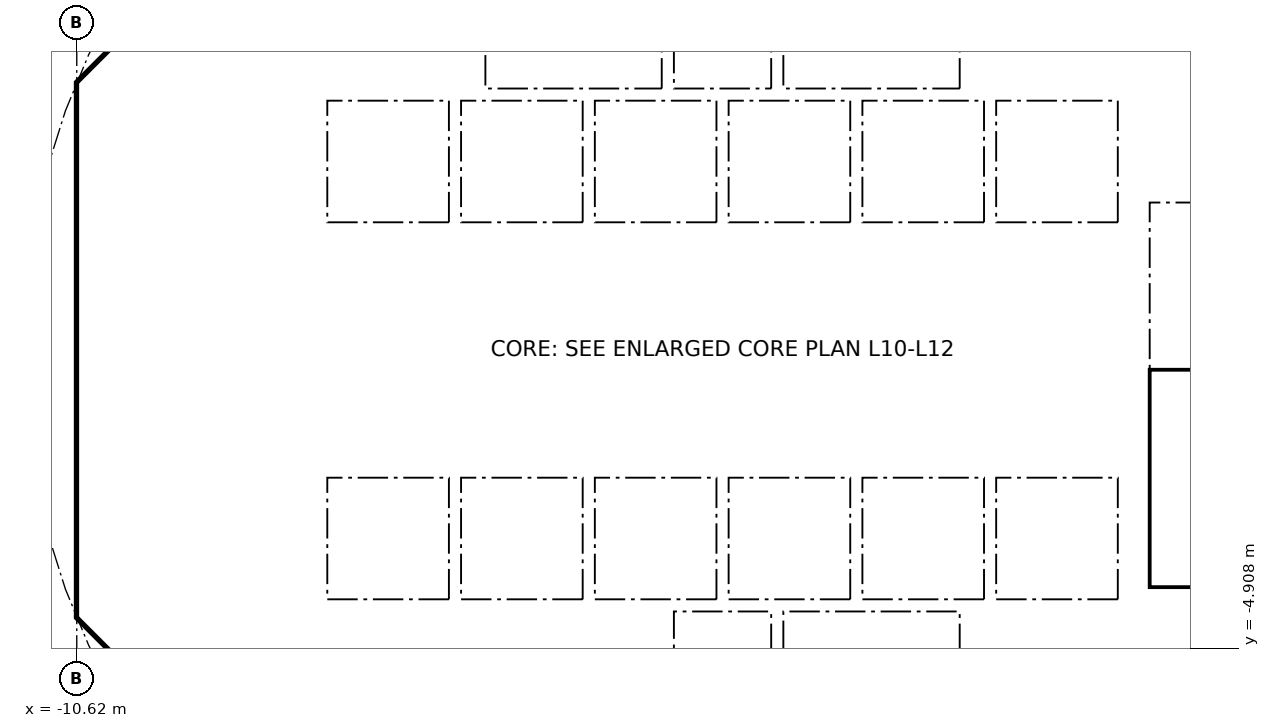
"""IFC4 building model, lengths in metres.
Left out: names, types, materials, properties, quantities, classifications, styles, units other than length and angle.
Written with IfcOpenShell. Run it as: python <this file> out.ifc"""

import sys

from ifc_helpers import new_model, si_unit, direction, frame, frame_2d, origin, place, context, subcontext, project, spatial, polyline, rectangle, outline, extrude, element, fill, save


model = new_model("IFC4")
c1 = context("Model", 3, precision=1e-05, world=origin(), true_north=direction((0.0, 1.0)))
c2 = subcontext(c1, "Body", "Model", "MODEL_VIEW")
j1 = project(units=[si_unit("LENGTHUNIT", "METRE"), si_unit("PLANEANGLEUNIT", "RADIAN")], contexts=[c1])
p1 = place(None, origin())
s1 = spatial("IfcSite", under=j1, at=p1, CompositionType="ELEMENT")
p2 = place(p1, origin())
s2 = spatial("IfcBuilding", under=s1, at=p2, CompositionType="ELEMENT")
p3 = place(p2, frame((0.0, 0.0, 49.2)))
s3 = spatial("IfcBuildingStorey", under=s2, at=p3, CompositionType="ELEMENT", Elevation=49.2)
p4 = place(p3, frame((9.988, 4.613, 0.0), z_axis=(0.0, 0.0, 1.0), x_axis=(-0.707106781187, 0.707106781187, 0.0)))
e1 = element("IfcWall", 1, at=p4, inside=s3, PredefinedType="SHEAR", context=c2, shape_type="SweptSolid", body=[
    extrude(rectangle(XDim=7.602, YDim=0.6, at=frame_2d((3.801, 0.0))), origin(), (0.0, 0.0, 1.0), 3.44),
])
p5 = place(p4, frame((3.201, 0.0, 0.0)))
e2 = element("IfcOpeningElement", 2, at=p5, cuts=e1, PredefinedType="OPENING", context=c2, shape_type="SweptSolid", body=[
    extrude(rectangle(XDim=1.2, YDim=2.1, at=frame_2d((0.6, 1.05))), frame((0.0, 0.31, 0.0), z_axis=(0.0, -1.0, 0.0), x_axis=(1.0, 0.0, 0.0)), (0.0, 0.0, 1.0), 0.62),
])
p6 = place(p3, frame((-4.613, 9.988, 0.0), z_axis=(0.0, 0.0, 1.0), x_axis=(-0.707106781187, -0.707106781187, 0.0)))
e3 = element("IfcWall", 3, at=p6, inside=s3, PredefinedType="SHEAR", context=c2, shape_type="SweptSolid", body=[
    extrude(rectangle(XDim=7.602, YDim=0.6, at=frame_2d((3.801, 0.0))), origin(), (0.0, 0.0, 1.0), 3.44),
])
p7 = place(p6, frame((0.351, 0.0, 0.0)))
e4 = element("IfcOpeningElement", 4, at=p7, cuts=e3, PredefinedType="OPENING", context=c2, shape_type="SweptSolid", body=[
    extrude(rectangle(XDim=1.1, YDim=2.1, at=frame_2d((0.55, 1.05))), frame((0.0, 0.31, 0.0), z_axis=(0.0, -1.0, 0.0), x_axis=(1.0, 0.0, 0.0)), (0.0, 0.0, 1.0), 0.62),
])
p8 = place(p3, frame((-10.325, 3.801, 0.0), z_axis=(0.0, 0.0, 1.0), x_axis=(0.0, -1.0, 0.0)))
e5 = element("IfcWall", 5, at=p8, inside=s3, PredefinedType="SHEAR", context=c2, shape_type="SweptSolid", body=[
    extrude(rectangle(XDim=7.602, YDim=0.6, at=frame_2d((3.801, 0.0))), origin(), (0.0, 0.0, 1.0), 3.44),
])
p9 = place(p8, frame((0.651, 0.0, 0.0)))
e6 = element("IfcOpeningElement", 6, at=p9, cuts=e5, PredefinedType="OPENING", context=c2, shape_type="SweptSolid", body=[
    extrude(rectangle(XDim=1.5, YDim=2.1, at=frame_2d((0.75, 1.05))), frame((0.0, 0.31, 0.0), z_axis=(0.0, -1.0, 0.0), x_axis=(1.0, 0.0, 0.0)), (0.0, 0.0, 1.0), 0.62),
])
p10 = place(p8, frame((5.451, 0.0, 0.0)))
e7 = element("IfcOpeningElement", 7, at=p10, cuts=e5, PredefinedType="OPENING", context=c2, shape_type="SweptSolid", body=[
    extrude(rectangle(XDim=1.5, YDim=2.1, at=frame_2d((0.75, 1.05))), frame((0.0, 0.31, 0.0), z_axis=(0.0, -1.0, 0.0), x_axis=(1.0, 0.0, 0.0)), (0.0, 0.0, 1.0), 0.62),
])
p11 = place(p3, frame((-9.988, -4.613, 0.0), z_axis=(0.0, 0.0, 1.0), x_axis=(0.707106781187, -0.707106781187, 0.0)))
e8 = element("IfcWall", 8, at=p11, inside=s3, PredefinedType="SHEAR", context=c2, shape_type="SweptSolid", body=[
    extrude(rectangle(XDim=7.602, YDim=0.6, at=frame_2d((3.801, 0.0))), origin(), (0.0, 0.0, 1.0), 3.44),
])
p12 = place(p11, frame((6.151, 0.0, 0.0)))
e9 = element("IfcOpeningElement", 9, at=p12, cuts=e8, PredefinedType="OPENING", context=c2, shape_type="SweptSolid", body=[
    extrude(rectangle(XDim=1.1, YDim=2.1, at=frame_2d((0.55, 1.05))), frame((0.0, 0.31, 0.0), z_axis=(0.0, -1.0, 0.0), x_axis=(1.0, 0.0, 0.0)), (0.0, 0.0, 1.0), 0.62),
])
p13 = place(p3, frame((4.613, -9.988, 0.0), z_axis=(0.0, 0.0, 1.0), x_axis=(0.707106781187, 0.707106781187, 0.0)))
e10 = element("IfcWall", 10, at=p13, inside=s3, PredefinedType="SHEAR", context=c2, shape_type="SweptSolid", body=[
    extrude(rectangle(XDim=7.602, YDim=0.6, at=frame_2d((3.801, 0.0))), origin(), (0.0, 0.0, 1.0), 3.44),
])
p14 = place(p13, frame((3.201, 0.0, 0.0)))
e11 = element("IfcOpeningElement", 11, at=p14, cuts=e10, PredefinedType="OPENING", context=c2, shape_type="SweptSolid", body=[
    extrude(rectangle(XDim=1.2, YDim=2.1, at=frame_2d((0.6, 1.05))), frame((0.0, 0.31, 0.0), z_axis=(0.0, -1.0, 0.0), x_axis=(1.0, 0.0, 0.0)), (0.0, 0.0, 1.0), 0.62),
])
p15 = place(p3, frame((-5.8, 4.3, 0.0), z_axis=(0.0, 0.0, 1.0), x_axis=(0.0, 1.0, 0.0)))
e12 = element("IfcWall", 12, at=p15, inside=s3, PredefinedType="PARTITIONING", context=c2, shape_type="SweptSolid", body=[
    extrude(rectangle(XDim=3.927, YDim=0.15, at=frame_2d((1.963, 0.0))), origin(), (0.0, 0.0, 1.0), 3.44),
])
p16 = place(p15, frame((1.551, 0.0, 0.0)))
e13 = element("IfcOpeningElement", 13, at=p16, cuts=e12, PredefinedType="OPENING", context=c2, shape_type="SweptSolid", body=[
    extrude(rectangle(XDim=0.9, YDim=2.1, at=frame_2d((0.45, 1.05))), frame((0.0, 0.085, 0.0), z_axis=(0.0, -1.0, 0.0), x_axis=(1.0, 0.0, 0.0)), (0.0, 0.0, 1.0), 0.17),
])
p17 = place(p3, frame((4.0, 4.3, 0.0), z_axis=(0.0, 0.0, 1.0), x_axis=(0.0, 1.0, 0.0)))
e14 = element("IfcWall", 14, at=p17, inside=s3, PredefinedType="SOLIDWALL", context=c2, shape_type="SweptSolid", body=[
    extrude(rectangle(XDim=2.2, YDim=0.2, at=frame_2d((1.1, 0.0))), origin(), (0.0, 0.0, 1.0), 3.44),
])
p18 = place(p17, frame((0.55, 0.0, 0.0)))
e15 = element("IfcOpeningElement", 15, at=p18, cuts=e14, PredefinedType="OPENING", context=c2, shape_type="SweptSolid", body=[
    extrude(rectangle(XDim=1.1, YDim=2.1, at=frame_2d((0.55, 1.05))), frame((0.0, 0.11, 0.0), z_axis=(0.0, -1.0, 0.0), x_axis=(1.0, 0.0, 0.0)), (0.0, 0.0, 1.0), 0.22),
])
p19 = place(p3, frame((-4.0, 4.3, 0.0), z_axis=(0.0, 0.0, 1.0), x_axis=(0.0, 1.0, 0.0)))
e16 = element("IfcWall", 16, at=p19, inside=s3, PredefinedType="SOLIDWALL", context=c2, shape_type="SweptSolid", body=[
    extrude(rectangle(XDim=2.2, YDim=0.2, at=frame_2d((1.1, 0.0))), origin(), (0.0, 0.0, 1.0), 3.44),
])
p20 = place(p19, frame((0.55, 0.0, 0.0)))
e17 = element("IfcOpeningElement", 17, at=p20, cuts=e16, PredefinedType="OPENING", context=c2, shape_type="SweptSolid", body=[
    extrude(rectangle(XDim=1.1, YDim=2.1, at=frame_2d((0.55, 1.05))), frame((0.0, 0.11, 0.0), z_axis=(0.0, -1.0, 0.0), x_axis=(1.0, 0.0, 0.0)), (0.0, 0.0, 1.0), 0.22),
])
p21 = place(p3, frame((-6.7, 2.0, 0.0), z_axis=(0.0, 0.0, 1.0), x_axis=(1.0, 0.0, 0.0)))
e18 = element("IfcWall", 18, at=p21, inside=s3, PredefinedType="SOLIDWALL", context=c2, shape_type="SweptSolid", body=[
    extrude(rectangle(XDim=13.4, YDim=0.2, at=frame_2d((6.7, 0.0))), origin(), (0.0, 0.0, 1.0), 3.44),
])
p22 = place(p21, frame((0.65, 0.0, 0.0)))
e19 = element("IfcOpeningElement", 19, at=p22, cuts=e18, PredefinedType="OPENING", context=c2, shape_type="SweptSolid", body=[
    extrude(rectangle(XDim=1.1, YDim=2.1, at=frame_2d((0.55, 1.05))), frame((0.0, 0.11, 0.0), z_axis=(0.0, -1.0, 0.0), x_axis=(1.0, 0.0, 0.0)), (0.0, 0.0, 1.0), 0.22),
])
p23 = place(p21, frame((2.85, 0.0, 0.0)))
e20 = element("IfcOpeningElement", 20, at=p23, cuts=e18, PredefinedType="OPENING", context=c2, shape_type="SweptSolid", body=[
    extrude(rectangle(XDim=1.1, YDim=2.1, at=frame_2d((0.55, 1.05))), frame((0.0, 0.11, 0.0), z_axis=(0.0, -1.0, 0.0), x_axis=(1.0, 0.0, 0.0)), (0.0, 0.0, 1.0), 0.22),
])
p24 = place(p21, frame((5.05, 0.0, 0.0)))
e21 = element("IfcOpeningElement", 21, at=p24, cuts=e18, PredefinedType="OPENING", context=c2, shape_type="SweptSolid", body=[
    extrude(rectangle(XDim=1.1, YDim=2.1, at=frame_2d((0.55, 1.05))), frame((0.0, 0.11, 0.0), z_axis=(0.0, -1.0, 0.0), x_axis=(1.0, 0.0, 0.0)), (0.0, 0.0, 1.0), 0.22),
])
p25 = place(p3, frame((6.7, 4.0, 0.0), z_axis=(0.0, 0.0, 1.0), x_axis=(1.0, 0.0, 0.0)))
e22 = element("IfcWall", 22, at=p25, inside=s3, PredefinedType="SOLIDWALL", context=c2, shape_type="SweptSolid", body=[
    extrude(rectangle(XDim=3.325, YDim=0.2, at=frame_2d((1.662, 0.0))), origin(), (0.0, 0.0, 1.0), 3.44),
])
p26 = place(p25, frame((1.25, 0.0, 0.0)))
e23 = element("IfcOpeningElement", 23, at=p26, cuts=e22, PredefinedType="OPENING", context=c2, shape_type="SweptSolid", body=[
    extrude(rectangle(XDim=1.1, YDim=2.1, at=frame_2d((0.55, 1.05))), frame((0.0, 0.11, 0.0), z_axis=(0.0, -1.0, 0.0), x_axis=(1.0, 0.0, 0.0)), (0.0, 0.0, 1.0), 0.22),
])
p27 = place(p3, frame((-6.2, -7.827, 0.0), z_axis=(0.0, 0.0, 1.0), x_axis=(0.0, 1.0, 0.0)))
e24 = element("IfcWall", 24, at=p27, inside=s3, PredefinedType="PARTITIONING", context=c2, shape_type="SweptSolid", body=[
    extrude(rectangle(XDim=3.527, YDim=0.15, at=frame_2d((1.763, 0.0))), origin(), (0.0, 0.0, 1.0), 3.44),
])
p28 = place(p27, frame((1.276, 0.0, 0.0)))
e25 = element("IfcOpeningElement", 25, at=p28, cuts=e24, PredefinedType="OPENING", context=c2, shape_type="SweptSolid", body=[
    extrude(rectangle(XDim=0.9, YDim=2.1, at=frame_2d((0.45, 1.05))), frame((0.0, 0.085, 0.0), z_axis=(0.0, -1.0, 0.0), x_axis=(1.0, 0.0, 0.0)), (0.0, 0.0, 1.0), 0.17),
])
p29 = place(p3, frame((4.0, -6.5, 0.0), z_axis=(0.0, 0.0, 1.0), x_axis=(0.0, 1.0, 0.0)))
e26 = element("IfcWall", 26, at=p29, inside=s3, PredefinedType="SOLIDWALL", context=c2, shape_type="SweptSolid", body=[
    extrude(rectangle(XDim=2.2, YDim=0.2, at=frame_2d((1.1, 0.0))), origin(), (0.0, 0.0, 1.0), 3.44),
])
p30 = place(p29, frame((0.55, 0.0, 0.0)))
e27 = element("IfcOpeningElement", 27, at=p30, cuts=e26, PredefinedType="OPENING", context=c2, shape_type="SweptSolid", body=[
    extrude(rectangle(XDim=1.1, YDim=2.1, at=frame_2d((0.55, 1.05))), frame((0.0, 0.11, 0.0), z_axis=(0.0, -1.0, 0.0), x_axis=(1.0, 0.0, 0.0)), (0.0, 0.0, 1.0), 0.22),
])
p31 = place(p3, frame((-4.0, -6.5, 0.0), z_axis=(0.0, 0.0, 1.0), x_axis=(0.0, 1.0, 0.0)))
e28 = element("IfcWall", 28, at=p31, inside=s3, PredefinedType="SOLIDWALL", context=c2, shape_type="SweptSolid", body=[
    extrude(rectangle(XDim=2.2, YDim=0.2, at=frame_2d((1.1, 0.0))), origin(), (0.0, 0.0, 1.0), 3.44),
])
p32 = place(p31, frame((0.65, 0.0, 0.0)))
e29 = element("IfcOpeningElement", 29, at=p32, cuts=e28, PredefinedType="OPENING", context=c2, shape_type="SweptSolid", body=[
    extrude(rectangle(XDim=0.9, YDim=2.1, at=frame_2d((0.45, 1.05))), frame((0.0, 0.11, 0.0), z_axis=(0.0, -1.0, 0.0), x_axis=(1.0, 0.0, 0.0)), (0.0, 0.0, 1.0), 0.22),
])
p33 = place(p3, frame((-6.7, -2.0, 0.0), z_axis=(0.0, 0.0, 1.0), x_axis=(1.0, 0.0, 0.0)))
e30 = element("IfcWall", 30, at=p33, inside=s3, PredefinedType="SOLIDWALL", context=c2, shape_type="SweptSolid", body=[
    extrude(rectangle(XDim=13.4, YDim=0.2, at=frame_2d((6.7, 0.0))), origin(), (0.0, 0.0, 1.0), 3.44),
])
p34 = place(p33, frame((0.65, 0.0, 0.0)))
e31 = element("IfcOpeningElement", 31, at=p34, cuts=e30, PredefinedType="OPENING", context=c2, shape_type="SweptSolid", body=[
    extrude(rectangle(XDim=1.1, YDim=2.1, at=frame_2d((0.55, 1.05))), frame((0.0, 0.11, 0.0), z_axis=(0.0, -1.0, 0.0), x_axis=(1.0, 0.0, 0.0)), (0.0, 0.0, 1.0), 0.22),
])
p35 = place(p33, frame((2.85, 0.0, 0.0)))
e32 = element("IfcOpeningElement", 32, at=p35, cuts=e30, PredefinedType="OPENING", context=c2, shape_type="SweptSolid", body=[
    extrude(rectangle(XDim=1.1, YDim=2.1, at=frame_2d((0.55, 1.05))), frame((0.0, 0.11, 0.0), z_axis=(0.0, -1.0, 0.0), x_axis=(1.0, 0.0, 0.0)), (0.0, 0.0, 1.0), 0.22),
])
p36 = place(p3, origin())
e33 = element("IfcWall", 33, at=p36, inside=s3, PredefinedType="SHEAR", context=c2, shape_type="SweptSolid", body=[
    extrude(outline(polyline([(-10.625, -3.801), (-10.025, -3.801), (-10.025, -4.152), (-9.776, -4.401), (-10.2, -4.825), (-10.625, -4.401), (-10.625, -3.801)])), origin(), (0.0, 0.0, 1.0), 3.44),
])
p37 = place(p3, origin())
e34 = element("IfcWall", 34, at=p37, inside=s3, PredefinedType="SHEAR", context=c2, shape_type="SweptSolid", body=[
    extrude(outline(polyline([(-10.2, 4.825), (-9.776, 4.401), (-10.025, 4.152), (-10.025, 3.801), (-10.625, 3.801), (-10.625, 4.401), (-10.2, 4.825)])), origin(), (0.0, 0.0, 1.0), 3.44),
])
for number, where, z_axis, x_axis in (
    (35, (-0.9, -6.5, 0.0), (0.0, 0.0, 1.0), (0.0, 1.0, 0.0)),
    (36, (0.9, -6.5, 0.0), (0.0, 0.0, 1.0), (0.0, 1.0, 0.0)),
):
    element("IfcWall", number, at=place(p3, frame(where, z_axis=z_axis, x_axis=x_axis)), inside=s3, PredefinedType="SOLIDWALL", context=c2, shape_type="SweptSolid", body=[
        extrude(rectangle(XDim=2.2, YDim=0.2, at=frame_2d((1.1, 0.0))), origin(), (0.0, 0.0, 1.0), 3.44),
    ])
p38 = place(p3, origin())
e37 = element("IfcWall", 37, at=p38, inside=s3, PredefinedType="SOLIDWALL", context=c2, shape_type="SweptSolid", body=[
    extrude(outline(polyline([(-6.7, -2.1), (-6.5, -2.1), (-6.5, -4.1), (-4.5, -4.1), (-4.5, -2.1), (-4.3, -2.1), (-4.3, -4.1), (-2.3, -4.1), (-2.3, -2.1), (-2.1, -2.1), (-2.1, -4.1), (-0.1, -4.1), (-0.1, -2.1), (0.1, -2.1), (0.1, -4.1), (2.1, -4.1), (2.1, -2.1), (2.3, -2.1), (2.3, -4.1), (4.3, -4.1), (4.3, -2.1), (4.5, -2.1), (4.5, -4.1), (6.5, -4.1), (6.5, -2.1), (6.7, -2.1), (6.7, -4.3), (-6.7, -4.3), (-6.7, -2.1)])), origin(), (0.0, 0.0, 1.0), 3.44),
])
for number, where, z_axis, x_axis in (
    (38, (-0.9, 4.3, 0.0), (0.0, 0.0, 1.0), (0.0, 1.0, 0.0)),
    (39, (0.9, 4.3, 0.0), (0.0, 0.0, 1.0), (0.0, 1.0, 0.0)),
):
    element("IfcWall", number, at=place(p3, frame(where, z_axis=z_axis, x_axis=x_axis)), inside=s3, PredefinedType="SOLIDWALL", context=c2, shape_type="SweptSolid", body=[
        extrude(rectangle(XDim=2.2, YDim=0.2, at=frame_2d((1.1, 0.0))), origin(), (0.0, 0.0, 1.0), 3.44),
    ])
p39 = place(p3, origin())
e40 = element("IfcWall", 40, at=p39, inside=s3, PredefinedType="SOLIDWALL", context=c2, shape_type="SweptSolid", body=[
    extrude(outline(polyline([(-6.5, 2.1), (-6.7, 2.1), (-6.7, 4.3), (6.7, 4.3), (6.7, 2.1), (6.5, 2.1), (6.5, 4.1), (4.5, 4.1), (4.5, 2.1), (4.3, 2.1), (4.3, 4.1), (2.3, 4.1), (2.3, 2.1), (2.1, 2.1), (2.1, 4.1), (0.1, 4.1), (0.1, 2.1), (-0.1, 2.1), (-0.1, 4.1), (-2.1, 4.1), (-2.1, 2.1), (-2.3, 2.1), (-2.3, 4.1), (-4.3, 4.1), (-4.3, 2.1), (-4.5, 2.1), (-4.5, 4.1), (-6.5, 4.1), (-6.5, 2.1)])), origin(), (0.0, 0.0, 1.0), 3.44),
])
for number, where, z_axis, x_axis in (
    (41, (-10.025, -4.0, 0.0), (0.0, 0.0, 1.0), (1.0, 0.0, 0.0)),
    (42, (-10.025, 4.0, 0.0), (0.0, 0.0, 1.0), (1.0, 0.0, 0.0)),
):
    element("IfcWall", number, at=place(p3, frame(where, z_axis=z_axis, x_axis=x_axis)), inside=s3, PredefinedType="PARTITIONING", context=c2, shape_type="SweptSolid", body=[
        extrude(rectangle(XDim=3.325, YDim=0.2, at=frame_2d((1.662, 0.0))), origin(), (0.0, 0.0, 1.0), 3.44),
    ])
p40 = place(p3, origin())
e43 = element("IfcWall", 43, at=p40, inside=s3, PredefinedType="SOLIDWALL", context=c2, shape_type="SweptSolid", body=[
    extrude(outline(polyline([(7.025, -3.9), (6.7, -3.9), (6.7, 3.9), (7.025, 3.9), (7.025, -3.9)])), origin(), (0.0, 0.0, 1.0), 3.44),
])
p41 = place(p3, origin())
e44 = element("IfcWall", 44, at=p41, inside=s3, PredefinedType="SOLIDWALL", context=c2, shape_type="SweptSolid", body=[
    extrude(outline(polyline([(10.025, -4.1), (6.7, -4.1), (6.7, -3.9), (10.025, -3.9), (10.025, -4.1)])), origin(), (0.0, 0.0, 1.0), 3.44),
])
p42 = place(p22, origin())
e45 = element("IfcDoor", 45, at=p42, inside=s3, OperationType="DOUBLE_DOOR_SLIDING", PredefinedType="DOOR", context=c2, shape_type="SweptSolid", body=[
    extrude(rectangle(XDim=1.1, YDim=2.1, at=frame_2d((0.55, 1.05))), frame((0.0, 0.025, 0.0), z_axis=(0.0, -1.0, 0.0), x_axis=(1.0, 0.0, 0.0)), (0.0, 0.0, 1.0), 0.05),
])
fill(e19, e45)
p43 = place(p23, origin())
e46 = element("IfcDoor", 46, at=p43, inside=s3, OperationType="DOUBLE_DOOR_SLIDING", PredefinedType="DOOR", context=c2, shape_type="SweptSolid", body=[
    extrude(rectangle(XDim=1.1, YDim=2.1, at=frame_2d((0.55, 1.05))), frame((0.0, 0.025, 0.0), z_axis=(0.0, -1.0, 0.0), x_axis=(1.0, 0.0, 0.0)), (0.0, 0.0, 1.0), 0.05),
])
fill(e20, e46)
p44 = place(p24, origin())
e47 = element("IfcDoor", 47, at=p44, inside=s3, OperationType="DOUBLE_DOOR_SLIDING", PredefinedType="DOOR", context=c2, shape_type="SweptSolid", body=[
    extrude(rectangle(XDim=1.1, YDim=2.1, at=frame_2d((0.55, 1.05))), frame((0.0, 0.025, 0.0), z_axis=(0.0, -1.0, 0.0), x_axis=(1.0, 0.0, 0.0)), (0.0, 0.0, 1.0), 0.05),
])
fill(e21, e47)
p45 = place(p34, origin())
e48 = element("IfcDoor", 48, at=p45, inside=s3, OperationType="DOUBLE_DOOR_SLIDING", PredefinedType="DOOR", context=c2, shape_type="SweptSolid", body=[
    extrude(rectangle(XDim=1.1, YDim=2.1, at=frame_2d((0.55, 1.05))), frame((0.0, 0.025, 0.0), z_axis=(0.0, -1.0, 0.0), x_axis=(1.0, 0.0, 0.0)), (0.0, 0.0, 1.0), 0.05),
])
fill(e31, e48)
p46 = place(p35, origin())
e49 = element("IfcDoor", 49, at=p46, inside=s3, OperationType="DOUBLE_DOOR_SLIDING", PredefinedType="DOOR", context=c2, shape_type="SweptSolid", body=[
    extrude(rectangle(XDim=1.1, YDim=2.1, at=frame_2d((0.55, 1.05))), frame((0.0, 0.025, 0.0), z_axis=(0.0, -1.0, 0.0), x_axis=(1.0, 0.0, 0.0)), (0.0, 0.0, 1.0), 0.05),
])
fill(e32, e49)
p47 = place(p18, origin())
e50 = element("IfcDoor", 50, at=p47, inside=s3, OperationType="DOUBLE_DOOR_SLIDING", PredefinedType="DOOR", context=c2, shape_type="SweptSolid", body=[
    extrude(rectangle(XDim=1.1, YDim=2.1, at=frame_2d((0.55, 1.05))), frame((0.0, 0.025, 0.0), z_axis=(0.0, -1.0, 0.0), x_axis=(1.0, 0.0, 0.0)), (0.0, 0.0, 1.0), 0.05),
])
fill(e15, e50)
p48 = place(p30, origin())
e51 = element("IfcDoor", 51, at=p48, inside=s3, OperationType="DOUBLE_DOOR_SLIDING", PredefinedType="DOOR", context=c2, shape_type="SweptSolid", body=[
    extrude(rectangle(XDim=1.1, YDim=2.1, at=frame_2d((0.55, 1.05))), frame((0.0, 0.025, 0.0), z_axis=(0.0, -1.0, 0.0), x_axis=(1.0, 0.0, 0.0)), (0.0, 0.0, 1.0), 0.05),
])
fill(e27, e51)
p49 = place(p20, origin())
e52 = element("IfcDoor", 52, at=p49, inside=s3, OperationType="DOUBLE_DOOR_SLIDING", PredefinedType="DOOR", context=c2, shape_type="SweptSolid", body=[
    extrude(rectangle(XDim=1.1, YDim=2.1, at=frame_2d((0.55, 1.05))), frame((0.0, 0.025, 0.0), z_axis=(0.0, -1.0, 0.0), x_axis=(1.0, 0.0, 0.0)), (0.0, 0.0, 1.0), 0.05),
])
fill(e17, e52)
p50 = place(p9, origin())
e53 = element("IfcDoor", 53, at=p50, inside=s3, OperationType="DOUBLE_DOOR_SINGLE_SWING", PredefinedType="DOOR", context=c2, shape_type="SweptSolid", body=[
    extrude(rectangle(XDim=1.5, YDim=2.1, at=frame_2d((0.75, 1.05))), frame((0.0, 0.025, 0.0), z_axis=(0.0, -1.0, 0.0), x_axis=(1.0, 0.0, 0.0)), (0.0, 0.0, 1.0), 0.05),
])
fill(e6, e53)
p51 = place(p10, origin())
e54 = element("IfcDoor", 54, at=p51, inside=s3, OperationType="DOUBLE_DOOR_SINGLE_SWING", PredefinedType="DOOR", context=c2, shape_type="SweptSolid", body=[
    extrude(rectangle(XDim=1.5, YDim=2.1, at=frame_2d((0.75, 1.05))), frame((0.0, 0.025, 0.0), z_axis=(0.0, -1.0, 0.0), x_axis=(1.0, 0.0, 0.0)), (0.0, 0.0, 1.0), 0.05),
])
fill(e7, e54)
save(model, sys.argv[1])
